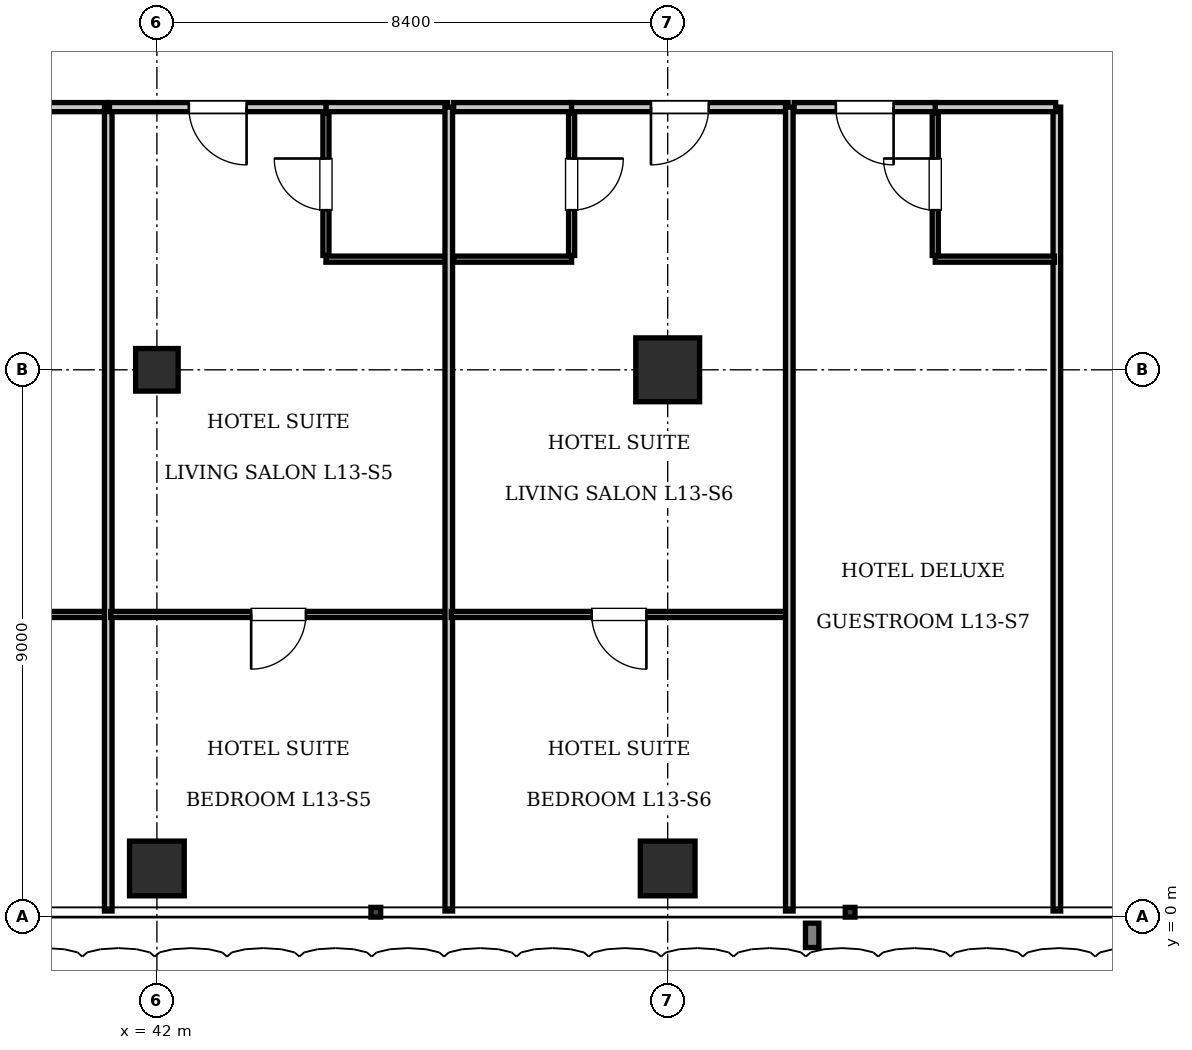
"""IFC4 building model, lengths in metres.
Left out: names, types, materials, properties, quantities, classifications, styles, units other than length and angle.
Written with IfcOpenShell. Run it as: python <this file> out.ifc"""

import sys

from ifc_helpers import new_model, si_unit, direction, frame, frame_2d, origin, origin_2d, place, context, subcontext, project, spatial, rectangle, i_section, extrude, element, fill, save


model = new_model("IFC4")
c1 = context("Model", 3, precision=1e-05, world=origin(), true_north=direction((0.0, 1.0)))
c2 = subcontext(c1, "Body", "Model", "MODEL_VIEW")
j1 = project(units=[si_unit("LENGTHUNIT", "METRE"), si_unit("PLANEANGLEUNIT", "RADIAN")], contexts=[c1])
p1 = place(None, origin())
s1 = spatial("IfcSite", under=j1, at=p1, CompositionType="ELEMENT")
p2 = place(p1, origin())
s2 = spatial("IfcBuilding", under=s1, at=p2, CompositionType="ELEMENT")
p3 = place(p2, frame((0.0, 0.0, 57.75)))
s3 = spatial("IfcBuildingStorey", under=s2, at=p3, CompositionType="ELEMENT", Elevation=57.75)
p4 = place(p3, frame((50.4, 9.0, 0.0), z_axis=(0.0, 0.0, 1.0), x_axis=(1.0, 0.0, 0.0)))
e1 = element("IfcColumn", 1, at=p4, inside=s3, PredefinedType="COLUMN", context=c2, shape_type="SweptSolid", body=[
    extrude(rectangle(XDim=1.05, YDim=1.05, at=origin_2d()), origin(), (0.0, 0.0, 1.0), 3.85),
])
p5 = place(p3, frame((42.0, 9.0, 0.0), z_axis=(0.0, 0.0, 1.0), x_axis=(1.0, 0.0, 0.0)))
e2 = element("IfcColumn", 2, at=p5, inside=s3, PredefinedType="COLUMN", context=c2, shape_type="SweptSolid", body=[
    extrude(i_section(OverallWidth=0.7, OverallDepth=0.7, WebThickness=0.028, FlangeThickness=0.044, at=origin_2d()), origin(), (0.0, 0.0, 1.0), 3.85),
])
for number, where, z_axis, x_axis in (
    (3, (42.0, 0.8, 0.0), (0.0, 0.0, 1.0), (1.0, 0.0, 0.0)),
    (4, (50.4, 0.8, 0.0), (0.0, 0.0, 1.0), (1.0, 0.0, 0.0)),
):
    element("IfcColumn", number, at=place(p3, frame(where, z_axis=z_axis, x_axis=x_axis)), inside=s3, PredefinedType="COLUMN", context=c2, shape_type="SweptSolid", body=[
        extrude(rectangle(XDim=0.9, YDim=0.9, at=origin_2d()), origin(), (0.0, 0.0, 1.0), 3.85),
    ])
p6 = place(p3, frame((56.8, 0.1, 0.0), z_axis=(0.0, 0.0, 1.0), x_axis=(0.0, 1.0, 0.0)))
e5 = element("IfcWall", 5, at=p6, inside=s3, PredefinedType="PARTITIONING", context=c2, shape_type="SweptSolid", body=[
    extrude(rectangle(XDim=13.22, YDim=0.125, at=frame_2d((6.61, 0.0))), origin(), (0.0, 0.0, 1.0), 3.61),
])
p7 = place(p3, frame((37.62, 13.32, 0.0), z_axis=(0.0, 0.0, 1.0), x_axis=(1.0, 0.0, 0.0)))
e6 = element("IfcWall", 6, at=p7, inside=s3, PredefinedType="PARTITIONING", context=c2, shape_type="SweptSolid", body=[
    extrude(rectangle(XDim=3.56, YDim=0.15, at=frame_2d((1.78, 0.0))), origin(), (0.0, 0.0, 1.0), 3.61),
])
p8 = place(p7, frame((1.305, 0.0, 0.0)))
e7 = element("IfcOpeningElement", 7, at=p8, cuts=e6, PredefinedType="OPENING", context=c2, shape_type="SweptSolid", body=[
    extrude(rectangle(XDim=0.95, YDim=2.15, at=frame_2d((0.475, 1.075))), frame((0.0, 0.085, 0.0), z_axis=(0.0, -1.0, 0.0), x_axis=(1.0, 0.0, 0.0)), (0.0, 0.0, 1.0), 0.17),
])
p9 = place(p3, frame((35.64, 4.977, 0.0), z_axis=(0.0, 0.0, 1.0), x_axis=(1.0, 0.0, 0.0)))
e8 = element("IfcWall", 8, at=p9, inside=s3, PredefinedType="PARTITIONING", context=c2, shape_type="SweptSolid", body=[
    extrude(rectangle(XDim=5.52, YDim=0.1, at=frame_2d((2.76, 0.0))), origin(), (0.0, 0.0, 1.0), 3.61),
])
p10 = place(p9, frame((2.31, 0.0, 0.0)))
e9 = element("IfcOpeningElement", 9, at=p10, cuts=e8, PredefinedType="OPENING", context=c2, shape_type="SweptSolid", body=[
    extrude(rectangle(XDim=0.9, YDim=2.1, at=frame_2d((0.45, 1.05))), frame((0.0, 0.06, 0.0), z_axis=(0.0, -1.0, 0.0), x_axis=(1.0, 0.0, 0.0)), (0.0, 0.0, 1.0), 0.12),
])
p11 = place(p3, frame((41.2, 0.1, 0.0), z_axis=(0.0, 0.0, 1.0), x_axis=(0.0, 1.0, 0.0)))
e10 = element("IfcWall", 10, at=p11, inside=s3, PredefinedType="PARTITIONING", context=c2, shape_type="SweptSolid", body=[
    extrude(rectangle(XDim=13.22, YDim=0.125, at=frame_2d((6.61, 0.0))), origin(), (0.0, 0.0, 1.0), 3.61),
])
p12 = place(p3, frame((44.78, 13.32, 0.0), z_axis=(0.0, 0.0, 1.0), x_axis=(1.0, 0.0, 0.0)))
e11 = element("IfcWall", 11, at=p12, inside=s3, PredefinedType="PARTITIONING", context=c2, shape_type="SweptSolid", body=[
    extrude(rectangle(XDim=2.0, YDim=0.15, at=frame_2d((1.0, 0.0))), origin(), (0.0, 0.0, 1.0), 3.61),
])
p13 = place(p3, frame((44.78, 10.82, 0.0), z_axis=(0.0, 0.0, 1.0), x_axis=(1.0, 0.0, 0.0)))
e12 = element("IfcWall", 12, at=p13, inside=s3, PredefinedType="PARTITIONING", context=c2, shape_type="SweptSolid", body=[
    extrude(rectangle(XDim=1.98, YDim=0.1, at=frame_2d((0.99, 0.0))), origin(), (0.0, 0.0, 1.0), 3.61),
])
p14 = place(p3, frame((44.78, 10.88, 0.0), z_axis=(0.0, 0.0, 1.0), x_axis=(0.0, 1.0, 0.0)))
e13 = element("IfcWall", 13, at=p14, inside=s3, PredefinedType="PARTITIONING", context=c2, shape_type="SweptSolid", body=[
    extrude(rectangle(XDim=2.34, YDim=0.1, at=frame_2d((1.17, 0.0))), origin(), (0.0, 0.0, 1.0), 3.61),
])
p15 = place(p14, frame((0.745, 0.0, 0.0)))
e14 = element("IfcOpeningElement", 14, at=p15, cuts=e13, PredefinedType="OPENING", context=c2, shape_type="SweptSolid", body=[
    extrude(rectangle(XDim=0.85, YDim=2.1, at=frame_2d((0.425, 1.05))), frame((0.0, 0.06, 0.0), z_axis=(0.0, -1.0, 0.0), x_axis=(1.0, 0.0, 0.0)), (0.0, 0.0, 1.0), 0.12),
])
p16 = place(p3, frame((41.22, 13.32, 0.0), z_axis=(0.0, 0.0, 1.0), x_axis=(1.0, 0.0, 0.0)))
e15 = element("IfcWall", 15, at=p16, inside=s3, PredefinedType="PARTITIONING", context=c2, shape_type="SweptSolid", body=[
    extrude(rectangle(XDim=3.56, YDim=0.15, at=frame_2d((1.78, 0.0))), origin(), (0.0, 0.0, 1.0), 3.61),
])
p17 = place(p16, frame((1.305, 0.0, 0.0)))
e16 = element("IfcOpeningElement", 16, at=p17, cuts=e15, PredefinedType="OPENING", context=c2, shape_type="SweptSolid", body=[
    extrude(rectangle(XDim=0.95, YDim=2.15, at=frame_2d((0.475, 1.075))), frame((0.0, 0.085, 0.0), z_axis=(0.0, -1.0, 0.0), x_axis=(1.0, 0.0, 0.0)), (0.0, 0.0, 1.0), 0.17),
])
p18 = place(p3, frame((41.24, 4.977, 0.0), z_axis=(0.0, 0.0, 1.0), x_axis=(1.0, 0.0, 0.0)))
e17 = element("IfcWall", 17, at=p18, inside=s3, PredefinedType="PARTITIONING", context=c2, shape_type="SweptSolid", body=[
    extrude(rectangle(XDim=5.52, YDim=0.1, at=frame_2d((2.76, 0.0))), origin(), (0.0, 0.0, 1.0), 3.61),
])
p19 = place(p18, frame((2.31, 0.0, 0.0)))
e18 = element("IfcOpeningElement", 18, at=p19, cuts=e17, PredefinedType="OPENING", context=c2, shape_type="SweptSolid", body=[
    extrude(rectangle(XDim=0.9, YDim=2.1, at=frame_2d((0.45, 1.05))), frame((0.0, 0.06, 0.0), z_axis=(0.0, -1.0, 0.0), x_axis=(1.0, 0.0, 0.0)), (0.0, 0.0, 1.0), 0.12),
])
p20 = place(p3, frame((46.8, 0.1, 0.0), z_axis=(0.0, 0.0, 1.0), x_axis=(0.0, 1.0, 0.0)))
e19 = element("IfcWall", 19, at=p20, inside=s3, PredefinedType="PARTITIONING", context=c2, shape_type="SweptSolid", body=[
    extrude(rectangle(XDim=13.22, YDim=0.125, at=frame_2d((6.61, 0.0))), origin(), (0.0, 0.0, 1.0), 3.61),
])
p21 = place(p3, frame((46.88, 13.32, 0.0), z_axis=(0.0, 0.0, 1.0), x_axis=(1.0, 0.0, 0.0)))
e20 = element("IfcWall", 20, at=p21, inside=s3, PredefinedType="PARTITIONING", context=c2, shape_type="SweptSolid", body=[
    extrude(rectangle(XDim=1.94, YDim=0.15, at=frame_2d((0.97, 0.0))), origin(), (0.0, 0.0, 1.0), 3.61),
])
p22 = place(p3, frame((46.88, 10.82, 0.0), z_axis=(0.0, 0.0, 1.0), x_axis=(1.0, 0.0, 0.0)))
e21 = element("IfcWall", 21, at=p22, inside=s3, PredefinedType="PARTITIONING", context=c2, shape_type="SweptSolid", body=[
    extrude(rectangle(XDim=1.94, YDim=0.1, at=frame_2d((0.97, 0.0))), origin(), (0.0, 0.0, 1.0), 3.61),
])
p23 = place(p3, frame((48.82, 10.88, 0.0), z_axis=(0.0, 0.0, 1.0), x_axis=(0.0, 1.0, 0.0)))
e22 = element("IfcWall", 22, at=p23, inside=s3, PredefinedType="PARTITIONING", context=c2, shape_type="SweptSolid", body=[
    extrude(rectangle(XDim=2.34, YDim=0.1, at=frame_2d((1.17, 0.0))), origin(), (0.0, 0.0, 1.0), 3.61),
])
p24 = place(p23, frame((0.745, 0.0, 0.0)))
e23 = element("IfcOpeningElement", 23, at=p24, cuts=e22, PredefinedType="OPENING", context=c2, shape_type="SweptSolid", body=[
    extrude(rectangle(XDim=0.85, YDim=2.1, at=frame_2d((0.425, 1.05))), frame((0.0, 0.06, 0.0), z_axis=(0.0, -1.0, 0.0), x_axis=(1.0, 0.0, 0.0)), (0.0, 0.0, 1.0), 0.12),
])
p25 = place(p3, frame((48.82, 13.32, 0.0), z_axis=(0.0, 0.0, 1.0), x_axis=(1.0, 0.0, 0.0)))
e24 = element("IfcWall", 24, at=p25, inside=s3, PredefinedType="PARTITIONING", context=c2, shape_type="SweptSolid", body=[
    extrude(rectangle(XDim=3.56, YDim=0.15, at=frame_2d((1.78, 0.0))), origin(), (0.0, 0.0, 1.0), 3.61),
])
p26 = place(p25, frame((1.305, 0.0, 0.0)))
e25 = element("IfcOpeningElement", 25, at=p26, cuts=e24, PredefinedType="OPENING", context=c2, shape_type="SweptSolid", body=[
    extrude(rectangle(XDim=0.95, YDim=2.15, at=frame_2d((0.475, 1.075))), frame((0.0, 0.085, 0.0), z_axis=(0.0, -1.0, 0.0), x_axis=(1.0, 0.0, 0.0)), (0.0, 0.0, 1.0), 0.17),
])
p27 = place(p3, frame((46.84, 4.977, 0.0), z_axis=(0.0, 0.0, 1.0), x_axis=(1.0, 0.0, 0.0)))
e26 = element("IfcWall", 26, at=p27, inside=s3, PredefinedType="PARTITIONING", context=c2, shape_type="SweptSolid", body=[
    extrude(rectangle(XDim=5.52, YDim=0.1, at=frame_2d((2.76, 0.0))), origin(), (0.0, 0.0, 1.0), 3.61),
])
p28 = place(p27, frame((2.31, 0.0, 0.0)))
e27 = element("IfcOpeningElement", 27, at=p28, cuts=e26, PredefinedType="OPENING", context=c2, shape_type="SweptSolid", body=[
    extrude(rectangle(XDim=0.9, YDim=2.1, at=frame_2d((0.45, 1.05))), frame((0.0, 0.06, 0.0), z_axis=(0.0, -1.0, 0.0), x_axis=(1.0, 0.0, 0.0)), (0.0, 0.0, 1.0), 0.12),
])
p29 = place(p3, frame((52.4, 0.1, 0.0), z_axis=(0.0, 0.0, 1.0), x_axis=(0.0, 1.0, 0.0)))
e28 = element("IfcWall", 28, at=p29, inside=s3, PredefinedType="PARTITIONING", context=c2, shape_type="SweptSolid", body=[
    extrude(rectangle(XDim=13.22, YDim=0.125, at=frame_2d((6.61, 0.0))), origin(), (0.0, 0.0, 1.0), 3.61),
])
p30 = place(p3, frame((54.8, 13.32, 0.0), z_axis=(0.0, 0.0, 1.0), x_axis=(1.0, 0.0, 0.0)))
e29 = element("IfcWall", 29, at=p30, inside=s3, PredefinedType="PARTITIONING", context=c2, shape_type="SweptSolid", body=[
    extrude(rectangle(XDim=1.98, YDim=0.15, at=frame_2d((0.99, 0.0))), origin(), (0.0, 0.0, 1.0), 3.61),
])
p31 = place(p3, frame((54.8, 10.82, 0.0), z_axis=(0.0, 0.0, 1.0), x_axis=(1.0, 0.0, 0.0)))
e30 = element("IfcWall", 30, at=p31, inside=s3, PredefinedType="PARTITIONING", context=c2, shape_type="SweptSolid", body=[
    extrude(rectangle(XDim=1.96, YDim=0.1, at=frame_2d((0.98, 0.0))), origin(), (0.0, 0.0, 1.0), 3.61),
])
p32 = place(p3, frame((54.8, 10.88, 0.0), z_axis=(0.0, 0.0, 1.0), x_axis=(0.0, 1.0, 0.0)))
e31 = element("IfcWall", 31, at=p32, inside=s3, PredefinedType="PARTITIONING", context=c2, shape_type="SweptSolid", body=[
    extrude(rectangle(XDim=2.34, YDim=0.1, at=frame_2d((1.17, 0.0))), origin(), (0.0, 0.0, 1.0), 3.61),
])
p33 = place(p32, frame((0.745, 0.0, 0.0)))
e32 = element("IfcOpeningElement", 32, at=p33, cuts=e31, PredefinedType="OPENING", context=c2, shape_type="SweptSolid", body=[
    extrude(rectangle(XDim=0.85, YDim=2.1, at=frame_2d((0.425, 1.05))), frame((0.0, 0.06, 0.0), z_axis=(0.0, -1.0, 0.0), x_axis=(1.0, 0.0, 0.0)), (0.0, 0.0, 1.0), 0.12),
])
p34 = place(p3, frame((52.48, 13.32, 0.0), z_axis=(0.0, 0.0, 1.0), x_axis=(1.0, 0.0, 0.0)))
e33 = element("IfcWall", 33, at=p34, inside=s3, PredefinedType="PARTITIONING", context=c2, shape_type="SweptSolid", body=[
    extrude(rectangle(XDim=2.32, YDim=0.15, at=frame_2d((1.16, 0.0))), origin(), (0.0, 0.0, 1.0), 3.61),
])
p35 = place(p34, frame((0.685, 0.0, 0.0)))
e34 = element("IfcOpeningElement", 34, at=p35, cuts=e33, PredefinedType="OPENING", context=c2, shape_type="SweptSolid", body=[
    extrude(rectangle(XDim=0.95, YDim=2.15, at=frame_2d((0.475, 1.075))), frame((0.0, 0.085, 0.0), z_axis=(0.0, -1.0, 0.0), x_axis=(1.0, 0.0, 0.0)), (0.0, 0.0, 1.0), 0.17),
])
p36 = place(p15, origin())
e35 = element("IfcDoor", 35, at=p36, inside=s3, OperationType="SINGLE_SWING_RIGHT", PredefinedType="DOOR", context=c2, shape_type="SweptSolid", body=[
    extrude(rectangle(XDim=0.85, YDim=2.1, at=frame_2d((0.425, 1.05))), frame((0.0, 0.025, 0.0), z_axis=(0.0, -1.0, 0.0), x_axis=(1.0, 0.0, 0.0)), (0.0, 0.0, 1.0), 0.05),
])
fill(e14, e35)
p37 = place(p17, frame((0.95, 0.0, 0.0), z_axis=(0.0, 0.0, 1.0), x_axis=(-1.0, 0.0, 0.0)))
e36 = element("IfcDoor", 36, at=p37, inside=s3, OperationType="SINGLE_SWING_LEFT", PredefinedType="DOOR", context=c2, shape_type="SweptSolid", body=[
    extrude(rectangle(XDim=0.95, YDim=2.15, at=frame_2d((0.475, 1.075))), frame((0.0, 0.025, 0.0), z_axis=(0.0, -1.0, 0.0), x_axis=(1.0, 0.0, 0.0)), (0.0, 0.0, 1.0), 0.05),
])
fill(e16, e36)
p38 = place(p19, frame((0.9, 0.0, 0.0), z_axis=(0.0, 0.0, 1.0), x_axis=(-1.0, 0.0, 0.0)))
e37 = element("IfcDoor", 37, at=p38, inside=s3, OperationType="SINGLE_SWING_RIGHT", PredefinedType="DOOR", context=c2, shape_type="SweptSolid", body=[
    extrude(rectangle(XDim=0.9, YDim=2.1, at=frame_2d((0.45, 1.05))), frame((0.0, 0.025, 0.0), z_axis=(0.0, -1.0, 0.0), x_axis=(1.0, 0.0, 0.0)), (0.0, 0.0, 1.0), 0.05),
])
fill(e18, e37)
p39 = place(p24, frame((0.85, 0.0, 0.0), z_axis=(0.0, 0.0, 1.0), x_axis=(-1.0, 0.0, 0.0)))
e38 = element("IfcDoor", 38, at=p39, inside=s3, OperationType="SINGLE_SWING_LEFT", PredefinedType="DOOR", context=c2, shape_type="SweptSolid", body=[
    extrude(rectangle(XDim=0.85, YDim=2.1, at=frame_2d((0.425, 1.05))), frame((0.0, 0.025, 0.0), z_axis=(0.0, -1.0, 0.0), x_axis=(1.0, 0.0, 0.0)), (0.0, 0.0, 1.0), 0.05),
])
fill(e23, e38)
p40 = place(p26, frame((0.95, 0.0, 0.0), z_axis=(0.0, 0.0, 1.0), x_axis=(-1.0, 0.0, 0.0)))
e39 = element("IfcDoor", 39, at=p40, inside=s3, OperationType="SINGLE_SWING_RIGHT", PredefinedType="DOOR", context=c2, shape_type="SweptSolid", body=[
    extrude(rectangle(XDim=0.95, YDim=2.15, at=frame_2d((0.475, 1.075))), frame((0.0, 0.025, 0.0), z_axis=(0.0, -1.0, 0.0), x_axis=(1.0, 0.0, 0.0)), (0.0, 0.0, 1.0), 0.05),
])
fill(e25, e39)
p41 = place(p28, frame((0.9, 0.0, 0.0), z_axis=(0.0, 0.0, 1.0), x_axis=(-1.0, 0.0, 0.0)))
e40 = element("IfcDoor", 40, at=p41, inside=s3, OperationType="SINGLE_SWING_LEFT", PredefinedType="DOOR", context=c2, shape_type="SweptSolid", body=[
    extrude(rectangle(XDim=0.9, YDim=2.1, at=frame_2d((0.45, 1.05))), frame((0.0, 0.025, 0.0), z_axis=(0.0, -1.0, 0.0), x_axis=(1.0, 0.0, 0.0)), (0.0, 0.0, 1.0), 0.05),
])
fill(e27, e40)
p42 = place(p33, origin())
e41 = element("IfcDoor", 41, at=p42, inside=s3, OperationType="SINGLE_SWING_RIGHT", PredefinedType="DOOR", context=c2, shape_type="SweptSolid", body=[
    extrude(rectangle(XDim=0.85, YDim=2.1, at=frame_2d((0.425, 1.05))), frame((0.0, 0.025, 0.0), z_axis=(0.0, -1.0, 0.0), x_axis=(1.0, 0.0, 0.0)), (0.0, 0.0, 1.0), 0.05),
])
fill(e32, e41)
p43 = place(p35, frame((0.95, 0.0, 0.0), z_axis=(0.0, 0.0, 1.0), x_axis=(-1.0, 0.0, 0.0)))
e42 = element("IfcDoor", 42, at=p43, inside=s3, OperationType="SINGLE_SWING_LEFT", PredefinedType="DOOR", context=c2, shape_type="SweptSolid", body=[
    extrude(rectangle(XDim=0.95, YDim=2.15, at=frame_2d((0.475, 1.075))), frame((0.0, 0.025, 0.0), z_axis=(0.0, -1.0, 0.0), x_axis=(1.0, 0.0, 0.0)), (0.0, 0.0, 1.0), 0.05),
])
fill(e34, e42)
save(model, sys.argv[1])
